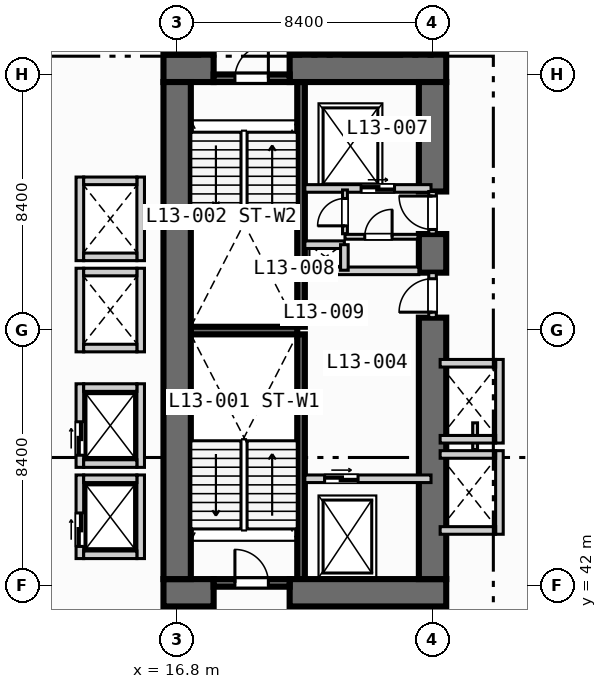
"""IFC4 building model, lengths in metres.
Left out: names, types, materials, properties, quantities, classifications, styles, units other than length and angle.
Written with IfcOpenShell. Run it as: python <this file> out.ifc"""

import sys

from ifc_helpers import new_model, si_unit, direction, frame, frame_2d, origin, place, context, subcontext, project, spatial, rectangle, extrude, element, fill, save


model = new_model("IFC4")
c1 = context("Model", 3, precision=1e-05, world=origin(), true_north=direction((0.0, 1.0)))
c2 = subcontext(c1, "Body", "Model", "MODEL_VIEW")
j1 = project(units=[si_unit("LENGTHUNIT", "METRE"), si_unit("PLANEANGLEUNIT", "RADIAN")], contexts=[c1])
p1 = place(None, origin())
s1 = spatial("IfcSite", under=j1, at=p1, CompositionType="ELEMENT")
p2 = place(p1, origin())
s2 = spatial("IfcBuilding", under=s1, at=p2, CompositionType="ELEMENT")
p3 = place(p2, frame((0.0, 0.0, 58.6)))
s3 = spatial("IfcBuildingStorey", under=s2, at=p3, CompositionType="ELEMENT", Elevation=58.6)
for number, where, z_axis, x_axis in (
    (1, (20.875, 42.2, 0.0), (0.0, 0.0, 1.0), (0.0, 1.0, 0.0)),
    (2, (20.875, 50.5, 0.0), (0.0, 0.0, 1.0), (0.0, 1.0, 0.0)),
):
    element("IfcWall", number, at=place(p3, frame(where, z_axis=z_axis, x_axis=x_axis)), inside=s3, PredefinedType="SOLIDWALL", context=c2, shape_type="SweptSolid", body=[
        extrude(rectangle(XDim=8.05, YDim=0.25, at=frame_2d((4.025, 0.0))), origin(), (0.0, 0.0, 1.0), 3.55),
    ])
p4 = place(p3, frame((17.25, 50.375, 0.0), z_axis=(0.0, 0.0, 1.0), x_axis=(1.0, 0.0, 0.0)))
e3 = element("IfcWall", 3, at=p4, inside=s3, PredefinedType="SOLIDWALL", context=c2, shape_type="SweptSolid", body=[
    extrude(rectangle(XDim=3.5, YDim=0.25, at=frame_2d((1.75, 0.0))), origin(), (0.0, 0.0, 1.0), 3.55),
])
p5 = place(p3, frame((16.35, 41.75, 0.0), z_axis=(0.0, 0.0, 1.0), x_axis=(1.0, 0.0, 0.0)))
e4 = element("IfcWall", 4, at=p5, inside=s3, PredefinedType="SHEAR", context=c2, shape_type="SweptSolid", body=[
    extrude(rectangle(XDim=1.65, YDim=0.9, at=frame_2d((0.825, 0.0))), origin(), (0.0, 0.0, 1.0), 3.55),
])
p6 = place(p3, frame((20.5, 41.75, 0.0), z_axis=(0.0, 0.0, 1.0), x_axis=(1.0, 0.0, 0.0)))
e5 = element("IfcWall", 5, at=p6, inside=s3, PredefinedType="SHEAR", context=c2, shape_type="SweptSolid", body=[
    extrude(rectangle(XDim=5.15, YDim=0.9, at=frame_2d((2.575, 0.0))), origin(), (0.0, 0.0, 1.0), 3.55),
])
p7 = place(p3, frame((16.35, 59.0, 0.0), z_axis=(0.0, 0.0, 1.0), x_axis=(1.0, 0.0, 0.0)))
e6 = element("IfcWall", 6, at=p7, inside=s3, PredefinedType="SHEAR", context=c2, shape_type="SweptSolid", body=[
    extrude(rectangle(XDim=1.65, YDim=0.9, at=frame_2d((0.825, 0.0))), origin(), (0.0, 0.0, 1.0), 3.55),
])
p8 = place(p3, frame((20.5, 59.0, 0.0), z_axis=(0.0, 0.0, 1.0), x_axis=(1.0, 0.0, 0.0)))
e7 = element("IfcWall", 7, at=p8, inside=s3, PredefinedType="SHEAR", context=c2, shape_type="SweptSolid", body=[
    extrude(rectangle(XDim=5.15, YDim=0.9, at=frame_2d((2.575, 0.0))), origin(), (0.0, 0.0, 1.0), 3.55),
])
p9 = place(p3, frame((16.8, 42.2, 0.0), z_axis=(0.0, 0.0, 1.0), x_axis=(0.0, 1.0, 0.0)))
e8 = element("IfcWall", 8, at=p9, inside=s3, PredefinedType="SHEAR", context=c2, shape_type="SweptSolid", body=[
    extrude(rectangle(XDim=16.35, YDim=0.9, at=frame_2d((8.175, 0.0))), origin(), (0.0, 0.0, 1.0), 3.55),
])
p10 = place(p3, frame((25.2, 42.2, 0.0), z_axis=(0.0, 0.0, 1.0), x_axis=(0.0, 1.0, 0.0)))
e9 = element("IfcWall", 9, at=p10, inside=s3, PredefinedType="SHEAR", context=c2, shape_type="SweptSolid", body=[
    extrude(rectangle(XDim=8.6, YDim=0.9, at=frame_2d((4.3, 0.0))), origin(), (0.0, 0.0, 1.0), 3.55),
])
p11 = place(p3, frame((25.2, 52.28, 0.0), z_axis=(0.0, 0.0, 1.0), x_axis=(0.0, 1.0, 0.0)))
e10 = element("IfcWall", 10, at=p11, inside=s3, PredefinedType="SHEAR", context=c2, shape_type="SweptSolid", body=[
    extrude(rectangle(XDim=1.27, YDim=0.9, at=frame_2d((0.635, 0.0))), origin(), (0.0, 0.0, 1.0), 3.55),
])
p12 = place(p3, frame((25.2, 54.95, 0.0), z_axis=(0.0, 0.0, 1.0), x_axis=(0.0, 1.0, 0.0)))
e11 = element("IfcWall", 11, at=p12, inside=s3, PredefinedType="SHEAR", context=c2, shape_type="SweptSolid", body=[
    extrude(rectangle(XDim=3.6, YDim=0.9, at=frame_2d((1.8, 0.0))), origin(), (0.0, 0.0, 1.0), 3.55),
])
p13 = place(p3, frame((18.0, 42.075, 0.0), z_axis=(0.0, 0.0, 1.0), x_axis=(1.0, 0.0, 0.0)))
e12 = element("IfcWall", 12, at=p13, inside=s3, PredefinedType="SOLIDWALL", context=c2, shape_type="SweptSolid", body=[
    extrude(rectangle(XDim=2.5, YDim=0.25, at=frame_2d((1.25, 0.0))), origin(), (0.0, 0.0, 1.0), 3.55),
])
p14 = place(p13, frame((0.7, 0.0, 0.0)))
e13 = element("IfcOpeningElement", 13, at=p14, cuts=e12, PredefinedType="OPENING", context=c2, shape_type="SweptSolid", body=[
    extrude(rectangle(XDim=1.1, YDim=2.15, at=frame_2d((0.55, 1.075))), frame((0.0, 0.135, 0.0), z_axis=(0.0, -1.0, 0.0), x_axis=(1.0, 0.0, 0.0)), (0.0, 0.0, 1.0), 0.27),
])
p15 = place(p3, frame((18.0, 58.675, 0.0), z_axis=(0.0, 0.0, 1.0), x_axis=(1.0, 0.0, 0.0)))
e14 = element("IfcWall", 14, at=p15, inside=s3, PredefinedType="SOLIDWALL", context=c2, shape_type="SweptSolid", body=[
    extrude(rectangle(XDim=2.5, YDim=0.25, at=frame_2d((1.25, 0.0))), origin(), (0.0, 0.0, 1.0), 3.55),
])
p16 = place(p15, frame((0.7, 0.0, 0.0)))
e15 = element("IfcOpeningElement", 15, at=p16, cuts=e14, PredefinedType="OPENING", context=c2, shape_type="SweptSolid", body=[
    extrude(rectangle(XDim=1.1, YDim=2.15, at=frame_2d((0.55, 1.075))), frame((0.0, 0.135, 0.0), z_axis=(0.0, -1.0, 0.0), x_axis=(1.0, 0.0, 0.0)), (0.0, 0.0, 1.0), 0.27),
])
p17 = place(p3, frame((21.0, 45.5, 0.0), z_axis=(0.0, 0.0, 1.0), x_axis=(1.0, 0.0, 0.0)))
e16 = element("IfcWall", 16, at=p17, inside=s3, PredefinedType="SOLIDWALL", context=c2, shape_type="SweptSolid", body=[
    extrude(rectangle(XDim=4.15, YDim=0.25, at=frame_2d((2.075, 0.0))), origin(), (0.0, 0.0, 1.0), 3.55),
])
p18 = place(p17, frame((0.65, 0.0, 0.0)))
e17 = element("IfcOpeningElement", 17, at=p18, cuts=e16, PredefinedType="OPENING", context=c2, shape_type="SweptSolid", body=[
    extrude(rectangle(XDim=1.1, YDim=2.15, at=frame_2d((0.55, 1.075))), frame((0.0, 0.135, 0.0), z_axis=(0.0, -1.0, 0.0), x_axis=(1.0, 0.0, 0.0)), (0.0, 0.0, 1.0), 0.27),
])
p19 = place(p3, frame((25.2, 50.8, 0.0), z_axis=(0.0, 0.0, 1.0), x_axis=(0.0, 1.0, 0.0)))
e18 = element("IfcWall", 18, at=p19, inside=s3, PredefinedType="SOLIDWALL", context=c2, shape_type="SweptSolid", body=[
    extrude(rectangle(XDim=1.48, YDim=0.25, at=frame_2d((0.74, 0.0))), origin(), (0.0, 0.0, 1.0), 3.55),
])
p20 = place(p19, frame((0.18, 0.0, 0.0)))
e19 = element("IfcOpeningElement", 19, at=p20, cuts=e18, PredefinedType="OPENING", context=c2, shape_type="SweptSolid", body=[
    extrude(rectangle(XDim=1.1, YDim=2.15, at=frame_2d((0.55, 1.075))), frame((0.0, 0.135, 0.0), z_axis=(0.0, -1.0, 0.0), x_axis=(1.0, 0.0, 0.0)), (0.0, 0.0, 1.0), 0.27),
])
p21 = place(p3, frame((21.0, 52.34, 0.0), z_axis=(0.0, 0.0, 1.0), x_axis=(1.0, 0.0, 0.0)))
e20 = element("IfcWall", 20, at=p21, inside=s3, PredefinedType="SOLIDWALL", context=c2, shape_type="SweptSolid", body=[
    extrude(rectangle(XDim=3.75, YDim=0.25, at=frame_2d((1.875, 0.0))), origin(), (0.0, 0.0, 1.0), 3.55),
])
p22 = place(p3, frame((21.0, 55.05, 0.0), z_axis=(0.0, 0.0, 1.0), x_axis=(1.0, 0.0, 0.0)))
e21 = element("IfcWall", 21, at=p22, inside=s3, PredefinedType="SOLIDWALL", context=c2, shape_type="SweptSolid", body=[
    extrude(rectangle(XDim=4.15, YDim=0.25, at=frame_2d((2.075, 0.0))), origin(), (0.0, 0.0, 1.0), 3.55),
])
p23 = place(p22, frame((1.85, 0.0, 0.0)))
e22 = element("IfcOpeningElement", 22, at=p23, cuts=e21, PredefinedType="OPENING", context=c2, shape_type="SweptSolid", body=[
    extrude(rectangle(XDim=1.1, YDim=2.15, at=frame_2d((0.55, 1.075))), frame((0.0, 0.135, 0.0), z_axis=(0.0, -1.0, 0.0), x_axis=(1.0, 0.0, 0.0)), (0.0, 0.0, 1.0), 0.27),
])
p24 = place(p3, frame((25.2, 53.55, 0.0), z_axis=(0.0, 0.0, 1.0), x_axis=(0.0, 1.0, 0.0)))
e23 = element("IfcWall", 23, at=p24, inside=s3, PredefinedType="SOLIDWALL", context=c2, shape_type="SweptSolid", body=[
    extrude(rectangle(XDim=1.4, YDim=0.25, at=frame_2d((0.7, 0.0))), origin(), (0.0, 0.0, 1.0), 3.55),
])
p25 = place(p24, frame((0.15, 0.0, 0.0)))
e24 = element("IfcOpeningElement", 24, at=p25, cuts=e23, PredefinedType="OPENING", context=c2, shape_type="SweptSolid", body=[
    extrude(rectangle(XDim=1.1, YDim=2.15, at=frame_2d((0.55, 1.075))), frame((0.0, 0.135, 0.0), z_axis=(0.0, -1.0, 0.0), x_axis=(1.0, 0.0, 0.0)), (0.0, 0.0, 1.0), 0.27),
])
p26 = place(p3, frame((21.0, 53.2, 0.0), z_axis=(0.0, 0.0, 1.0), x_axis=(1.0, 0.0, 0.0)))
e25 = element("IfcWall", 25, at=p26, inside=s3, PredefinedType="SOLIDWALL", context=c2, shape_type="SweptSolid", body=[
    extrude(rectangle(XDim=1.3, YDim=0.25, at=frame_2d((0.65, 0.0))), origin(), (0.0, 0.0, 1.0), 3.55),
])
p27 = place(p3, frame((22.3, 52.36, 0.0), z_axis=(0.0, 0.0, 1.0), x_axis=(0.0, 1.0, 0.0)))
e26 = element("IfcWall", 26, at=p27, inside=s3, PredefinedType="SOLIDWALL", context=c2, shape_type="SweptSolid", body=[
    extrude(rectangle(XDim=0.84, YDim=0.25, at=frame_2d((0.42, 0.0))), origin(), (0.0, 0.0, 1.0), 3.55),
])
p28 = place(p3, frame((22.32, 53.56, 0.0), z_axis=(0.0, 0.0, 1.0), x_axis=(0.0, 1.0, 0.0)))
e27 = element("IfcWall", 27, at=p28, inside=s3, PredefinedType="PARTITIONING", context=c2, shape_type="SweptSolid", body=[
    extrude(rectangle(XDim=1.44, YDim=0.16, at=frame_2d((0.72, 0.0))), origin(), (0.0, 0.0, 1.0), 3.55),
])
p29 = place(p28, frame((0.26, 0.0, 0.0)))
e28 = element("IfcOpeningElement", 28, at=p29, cuts=e27, PredefinedType="OPENING", context=c2, shape_type="SweptSolid", body=[
    extrude(rectangle(XDim=0.9, YDim=2.1, at=frame_2d((0.45, 1.05))), frame((0.0, 0.09, 0.0), z_axis=(0.0, -1.0, 0.0), x_axis=(1.0, 0.0, 0.0)), (0.0, 0.0, 1.0), 0.18),
])
p30 = place(p3, frame((22.32, 53.46, 0.0), z_axis=(0.0, 0.0, 1.0), x_axis=(1.0, 0.0, 0.0)))
e29 = element("IfcWall", 29, at=p30, inside=s3, PredefinedType="PARTITIONING", context=c2, shape_type="SweptSolid", body=[
    extrude(rectangle(XDim=2.4, YDim=0.16, at=frame_2d((1.2, 0.0))), origin(), (0.0, 0.0, 1.0), 3.55),
])
p31 = place(p30, frame((0.65, 0.0, 0.0)))
e30 = element("IfcOpeningElement", 30, at=p31, cuts=e29, PredefinedType="OPENING", context=c2, shape_type="SweptSolid", body=[
    extrude(rectangle(XDim=0.9, YDim=2.1, at=frame_2d((0.45, 1.05))), frame((0.0, 0.09, 0.0), z_axis=(0.0, -1.0, 0.0), x_axis=(1.0, 0.0, 0.0)), (0.0, 0.0, 1.0), 0.18),
])
p32 = place(p3, frame((13.6, 42.875, 0.0), z_axis=(0.0, 0.0, 1.0), x_axis=(0.0, 1.0, 0.0)))
e31 = element("IfcWall", 31, at=p32, inside=s3, PredefinedType="SOLIDWALL", context=c2, shape_type="SweptSolid", body=[
    extrude(rectangle(XDim=2.75, YDim=0.25, at=frame_2d((1.375, 0.0))), origin(), (0.0, 0.0, 1.0), 3.55),
])
p33 = place(p32, frame((0.4, 0.0, 0.0)))
e32 = element("IfcOpeningElement", 32, at=p33, cuts=e31, PredefinedType="OPENING", context=c2, shape_type="SweptSolid", body=[
    extrude(rectangle(XDim=1.1, YDim=2.15, at=frame_2d((0.55, 1.075))), frame((0.0, 0.135, 0.0), z_axis=(0.0, -1.0, 0.0), x_axis=(1.0, 0.0, 0.0)), (0.0, 0.0, 1.0), 0.27),
])
p34 = place(p3, frame((15.6, 42.875, 0.0), z_axis=(0.0, 0.0, 1.0), x_axis=(0.0, 1.0, 0.0)))
e33 = element("IfcWall", 33, at=p34, inside=s3, PredefinedType="SOLIDWALL", context=c2, shape_type="SweptSolid", body=[
    extrude(rectangle(XDim=2.75, YDim=0.25, at=frame_2d((1.375, 0.0))), origin(), (0.0, 0.0, 1.0), 3.55),
])
for number, where, z_axis, x_axis in (
    (34, (13.725, 43.0, 0.0), (0.0, 0.0, 1.0), (1.0, 0.0, 0.0)),
    (35, (13.725, 45.5, 0.0), (0.0, 0.0, 1.0), (1.0, 0.0, 0.0)),
):
    element("IfcWall", number, at=place(p3, frame(where, z_axis=z_axis, x_axis=x_axis)), inside=s3, PredefinedType="SOLIDWALL", context=c2, shape_type="SweptSolid", body=[
        extrude(rectangle(XDim=1.75, YDim=0.25, at=frame_2d((0.875, 0.0))), origin(), (0.0, 0.0, 1.0), 3.55),
    ])
p35 = place(p3, frame((13.6, 45.875, 0.0), z_axis=(0.0, 0.0, 1.0), x_axis=(0.0, 1.0, 0.0)))
e36 = element("IfcWall", 36, at=p35, inside=s3, PredefinedType="SOLIDWALL", context=c2, shape_type="SweptSolid", body=[
    extrude(rectangle(XDim=2.75, YDim=0.25, at=frame_2d((1.375, 0.0))), origin(), (0.0, 0.0, 1.0), 3.55),
])
p36 = place(p35, frame((0.4, 0.0, 0.0)))
e37 = element("IfcOpeningElement", 37, at=p36, cuts=e36, PredefinedType="OPENING", context=c2, shape_type="SweptSolid", body=[
    extrude(rectangle(XDim=1.1, YDim=2.15, at=frame_2d((0.55, 1.075))), frame((0.0, 0.135, 0.0), z_axis=(0.0, -1.0, 0.0), x_axis=(1.0, 0.0, 0.0)), (0.0, 0.0, 1.0), 0.27),
])
p37 = place(p3, frame((15.6, 45.875, 0.0), z_axis=(0.0, 0.0, 1.0), x_axis=(0.0, 1.0, 0.0)))
e38 = element("IfcWall", 38, at=p37, inside=s3, PredefinedType="SOLIDWALL", context=c2, shape_type="SweptSolid", body=[
    extrude(rectangle(XDim=2.75, YDim=0.25, at=frame_2d((1.375, 0.0))), origin(), (0.0, 0.0, 1.0), 3.55),
])
for number, where, z_axis, x_axis in (
    (39, (13.725, 46.0, 0.0), (0.0, 0.0, 1.0), (1.0, 0.0, 0.0)),
    (40, (13.725, 48.5, 0.0), (0.0, 0.0, 1.0), (1.0, 0.0, 0.0)),
):
    element("IfcWall", number, at=place(p3, frame(where, z_axis=z_axis, x_axis=x_axis)), inside=s3, PredefinedType="SOLIDWALL", context=c2, shape_type="SweptSolid", body=[
        extrude(rectangle(XDim=1.75, YDim=0.25, at=frame_2d((0.875, 0.0))), origin(), (0.0, 0.0, 1.0), 3.55),
    ])
for number, where, z_axis, x_axis in (
    (41, (13.6, 49.675, 0.0), (0.0, 0.0, 1.0), (0.0, 1.0, 0.0)),
    (42, (15.6, 49.675, 0.0), (0.0, 0.0, 1.0), (0.0, 1.0, 0.0)),
):
    element("IfcWall", number, at=place(p3, frame(where, z_axis=z_axis, x_axis=x_axis)), inside=s3, PredefinedType="SOLIDWALL", context=c2, shape_type="SweptSolid", body=[
        extrude(rectangle(XDim=2.75, YDim=0.25, at=frame_2d((1.375, 0.0))), origin(), (0.0, 0.0, 1.0), 3.55),
    ])
for number, where, z_axis, x_axis in (
    (43, (13.725, 49.8, 0.0), (0.0, 0.0, 1.0), (1.0, 0.0, 0.0)),
    (44, (13.725, 52.3, 0.0), (0.0, 0.0, 1.0), (1.0, 0.0, 0.0)),
):
    element("IfcWall", number, at=place(p3, frame(where, z_axis=z_axis, x_axis=x_axis)), inside=s3, PredefinedType="SOLIDWALL", context=c2, shape_type="SweptSolid", body=[
        extrude(rectangle(XDim=1.75, YDim=0.25, at=frame_2d((0.875, 0.0))), origin(), (0.0, 0.0, 1.0), 3.55),
    ])
for number, where, z_axis, x_axis in (
    (45, (13.6, 52.675, 0.0), (0.0, 0.0, 1.0), (0.0, 1.0, 0.0)),
    (46, (15.6, 52.675, 0.0), (0.0, 0.0, 1.0), (0.0, 1.0, 0.0)),
):
    element("IfcWall", number, at=place(p3, frame(where, z_axis=z_axis, x_axis=x_axis)), inside=s3, PredefinedType="SOLIDWALL", context=c2, shape_type="SweptSolid", body=[
        extrude(rectangle(XDim=2.75, YDim=0.25, at=frame_2d((1.375, 0.0))), origin(), (0.0, 0.0, 1.0), 3.55),
    ])
for number, where, z_axis, x_axis in (
    (47, (13.725, 52.8, 0.0), (0.0, 0.0, 1.0), (1.0, 0.0, 0.0)),
    (48, (13.725, 55.3, 0.0), (0.0, 0.0, 1.0), (1.0, 0.0, 0.0)),
):
    element("IfcWall", number, at=place(p3, frame(where, z_axis=z_axis, x_axis=x_axis)), inside=s3, PredefinedType="SOLIDWALL", context=c2, shape_type="SweptSolid", body=[
        extrude(rectangle(XDim=1.75, YDim=0.25, at=frame_2d((0.875, 0.0))), origin(), (0.0, 0.0, 1.0), 3.55),
    ])
p38 = place(p3, frame((27.4, 43.675, 0.0), z_axis=(0.0, 0.0, 1.0), x_axis=(0.0, 1.0, 0.0)))
e49 = element("IfcWall", 49, at=p38, inside=s3, PredefinedType="SOLIDWALL", context=c2, shape_type="SweptSolid", body=[
    extrude(rectangle(XDim=2.75, YDim=0.25, at=frame_2d((1.375, 0.0))), origin(), (0.0, 0.0, 1.0), 3.55),
])
for number, where, z_axis, x_axis in (
    (50, (25.45, 43.8, 0.0), (0.0, 0.0, 1.0), (1.0, 0.0, 0.0)),
    (51, (25.45, 46.3, 0.0), (0.0, 0.0, 1.0), (1.0, 0.0, 0.0)),
):
    element("IfcWall", number, at=place(p3, frame(where, z_axis=z_axis, x_axis=x_axis)), inside=s3, PredefinedType="SOLIDWALL", context=c2, shape_type="SweptSolid", body=[
        extrude(rectangle(XDim=1.825, YDim=0.25, at=frame_2d((0.913, 0.0))), origin(), (0.0, 0.0, 1.0), 3.55),
    ])
p39 = place(p3, frame((26.6, 46.46, 0.0), z_axis=(0.0, 0.0, 1.0), x_axis=(0.0, 1.0, 0.0)))
e52 = element("IfcWall", 52, at=p39, inside=s3, PredefinedType="PARTITIONING", context=c2, shape_type="SweptSolid", body=[
    extrude(rectangle(XDim=0.88, YDim=0.16, at=frame_2d((0.44, 0.0))), origin(), (0.0, 0.0, 1.0), 3.55),
])
p40 = place(p3, frame((27.4, 46.675, 0.0), z_axis=(0.0, 0.0, 1.0), x_axis=(0.0, 1.0, 0.0)))
e53 = element("IfcWall", 53, at=p40, inside=s3, PredefinedType="SOLIDWALL", context=c2, shape_type="SweptSolid", body=[
    extrude(rectangle(XDim=2.75, YDim=0.25, at=frame_2d((1.375, 0.0))), origin(), (0.0, 0.0, 1.0), 3.55),
])
for number, where, z_axis, x_axis in (
    (54, (25.45, 46.8, 0.0), (0.0, 0.0, 1.0), (1.0, 0.0, 0.0)),
    (55, (25.45, 49.3, 0.0), (0.0, 0.0, 1.0), (1.0, 0.0, 0.0)),
):
    element("IfcWall", number, at=place(p3, frame(where, z_axis=z_axis, x_axis=x_axis)), inside=s3, PredefinedType="SOLIDWALL", context=c2, shape_type="SweptSolid", body=[
        extrude(rectangle(XDim=1.825, YDim=0.25, at=frame_2d((0.913, 0.0))), origin(), (0.0, 0.0, 1.0), 3.55),
    ])
p41 = place(p14, origin())
e56 = element("IfcDoor", 56, at=p41, inside=s3, OperationType="SINGLE_SWING_LEFT", PredefinedType="DOOR", context=c2, shape_type="SweptSolid", body=[
    extrude(rectangle(XDim=1.1, YDim=2.15, at=frame_2d((0.55, 1.075))), frame((0.0, 0.025, 0.0), z_axis=(0.0, -1.0, 0.0), x_axis=(1.0, 0.0, 0.0)), (0.0, 0.0, 1.0), 0.05),
])
fill(e13, e56)
p42 = place(p16, origin())
e57 = element("IfcDoor", 57, at=p42, inside=s3, OperationType="SINGLE_SWING_RIGHT", PredefinedType="DOOR", context=c2, shape_type="SweptSolid", body=[
    extrude(rectangle(XDim=1.1, YDim=2.15, at=frame_2d((0.55, 1.075))), frame((0.0, 0.025, 0.0), z_axis=(0.0, -1.0, 0.0), x_axis=(1.0, 0.0, 0.0)), (0.0, 0.0, 1.0), 0.05),
])
fill(e15, e57)
p43 = place(p18, origin())
e58 = element("IfcDoor", 58, at=p43, inside=s3, OperationType="SLIDING_TO_LEFT", PredefinedType="DOOR", context=c2, shape_type="SweptSolid", body=[
    extrude(rectangle(XDim=1.1, YDim=2.15, at=frame_2d((0.55, 1.075))), frame((0.0, 0.025, 0.0), z_axis=(0.0, -1.0, 0.0), x_axis=(1.0, 0.0, 0.0)), (0.0, 0.0, 1.0), 0.05),
])
fill(e17, e58)
p44 = place(p20, origin())
e59 = element("IfcDoor", 59, at=p44, inside=s3, OperationType="SINGLE_SWING_LEFT", PredefinedType="DOOR", context=c2, shape_type="SweptSolid", body=[
    extrude(rectangle(XDim=1.1, YDim=2.15, at=frame_2d((0.55, 1.075))), frame((0.0, 0.025, 0.0), z_axis=(0.0, -1.0, 0.0), x_axis=(1.0, 0.0, 0.0)), (0.0, 0.0, 1.0), 0.05),
])
fill(e19, e59)
p45 = place(p23, origin())
e60 = element("IfcDoor", 60, at=p45, inside=s3, OperationType="SLIDING_TO_LEFT", PredefinedType="DOOR", context=c2, shape_type="SweptSolid", body=[
    extrude(rectangle(XDim=1.1, YDim=2.15, at=frame_2d((0.55, 1.075))), frame((0.0, 0.025, 0.0), z_axis=(0.0, -1.0, 0.0), x_axis=(1.0, 0.0, 0.0)), (0.0, 0.0, 1.0), 0.05),
])
fill(e22, e60)
p46 = place(p25, origin())
e61 = element("IfcDoor", 61, at=p46, inside=s3, OperationType="SINGLE_SWING_RIGHT", PredefinedType="DOOR", context=c2, shape_type="SweptSolid", body=[
    extrude(rectangle(XDim=1.1, YDim=2.15, at=frame_2d((0.55, 1.075))), frame((0.0, 0.025, 0.0), z_axis=(0.0, -1.0, 0.0), x_axis=(1.0, 0.0, 0.0)), (0.0, 0.0, 1.0), 0.05),
])
fill(e24, e61)
p47 = place(p29, origin())
e62 = element("IfcDoor", 62, at=p47, inside=s3, OperationType="SINGLE_SWING_LEFT", PredefinedType="DOOR", context=c2, shape_type="SweptSolid", body=[
    extrude(rectangle(XDim=0.9, YDim=2.1, at=frame_2d((0.45, 1.05))), frame((0.0, 0.025, 0.0), z_axis=(0.0, -1.0, 0.0), x_axis=(1.0, 0.0, 0.0)), (0.0, 0.0, 1.0), 0.05),
])
fill(e28, e62)
p48 = place(p31, origin())
e63 = element("IfcDoor", 63, at=p48, inside=s3, OperationType="SINGLE_SWING_RIGHT", PredefinedType="DOOR", context=c2, shape_type="SweptSolid", body=[
    extrude(rectangle(XDim=0.9, YDim=2.1, at=frame_2d((0.45, 1.05))), frame((0.0, 0.025, 0.0), z_axis=(0.0, -1.0, 0.0), x_axis=(1.0, 0.0, 0.0)), (0.0, 0.0, 1.0), 0.05),
])
fill(e30, e63)
p49 = place(p33, origin())
e64 = element("IfcDoor", 64, at=p49, inside=s3, OperationType="SLIDING_TO_LEFT", PredefinedType="DOOR", context=c2, shape_type="SweptSolid", body=[
    extrude(rectangle(XDim=1.1, YDim=2.15, at=frame_2d((0.55, 1.075))), frame((0.0, 0.025, 0.0), z_axis=(0.0, -1.0, 0.0), x_axis=(1.0, 0.0, 0.0)), (0.0, 0.0, 1.0), 0.05),
])
fill(e32, e64)
p50 = place(p36, origin())
e65 = element("IfcDoor", 65, at=p50, inside=s3, OperationType="SLIDING_TO_LEFT", PredefinedType="DOOR", context=c2, shape_type="SweptSolid", body=[
    extrude(rectangle(XDim=1.1, YDim=2.15, at=frame_2d((0.55, 1.075))), frame((0.0, 0.025, 0.0), z_axis=(0.0, -1.0, 0.0), x_axis=(1.0, 0.0, 0.0)), (0.0, 0.0, 1.0), 0.05),
])
fill(e37, e65)
save(model, sys.argv[1])
